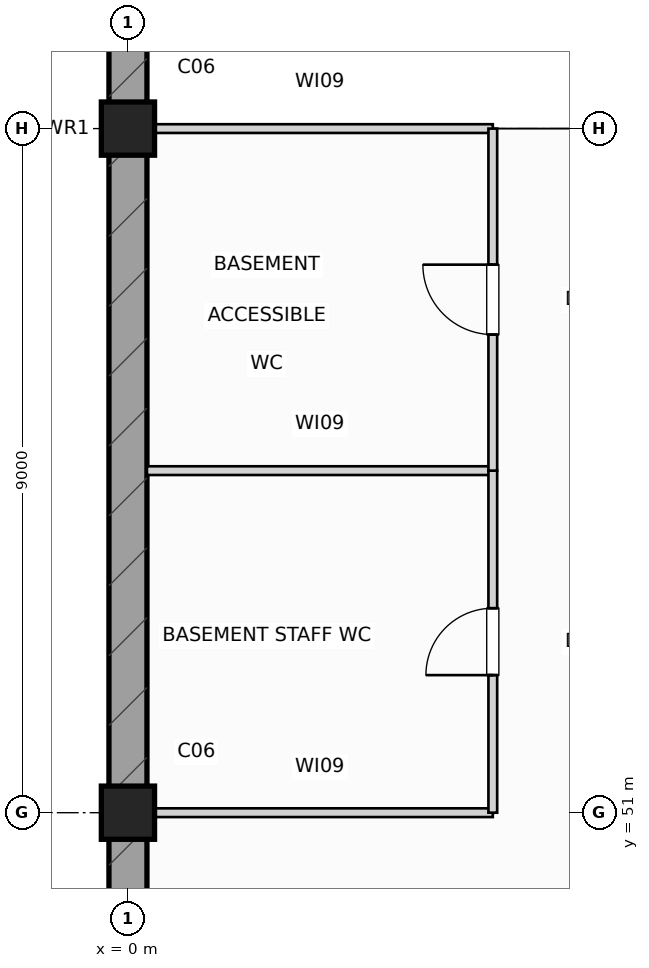
"""IFC4 building model, lengths in metres.
Left out: names, types, materials, properties, quantities, classifications, styles, units other than length and angle.
Written with IfcOpenShell. Run it as: python <this file> out.ifc"""

import sys

from ifc_helpers import new_model, si_unit, direction, frame, frame_2d, origin, origin_2d, place, context, subcontext, project, spatial, rectangle, extrude, element, fill, save


model = new_model("IFC4")
c1 = context("Model", 3, precision=1e-05, world=origin(), true_north=direction((0.0, 1.0)))
c2 = subcontext(c1, "Body", "Model", "MODEL_VIEW")
j1 = project(units=[si_unit("LENGTHUNIT", "METRE"), si_unit("PLANEANGLEUNIT", "RADIAN")], contexts=[c1])
p1 = place(None, origin())
s1 = spatial("IfcSite", under=j1, at=p1, CompositionType="ELEMENT")
p2 = place(p1, origin())
s2 = spatial("IfcBuilding", under=s1, at=p2, CompositionType="ELEMENT")
p3 = place(p2, frame((0.0, 0.0, -5.4)))
s3 = spatial("IfcBuildingStorey", under=s2, at=p3, CompositionType="ELEMENT", Elevation=-5.4)
for number, where, z_axis, x_axis in (
    (1, (0.0, 51.0, 0.0), (0.0, 0.0, 1.0), (1.0, 0.0, 0.0)),
    (2, (0.0, 60.0, 0.0), (0.0, 0.0, 1.0), (1.0, 0.0, 0.0)),
):
    element("IfcColumn", number, at=place(p3, frame(where, z_axis=z_axis, x_axis=x_axis)), inside=s3, PredefinedType="COLUMN", context=c2, shape_type="SweptSolid", body=[
        extrude(rectangle(XDim=0.7, YDim=0.7, at=origin_2d()), origin(), (0.0, 0.0, 1.0), 5.4),
    ])
p4 = place(p3, frame((0.0, 0.0, 0.0), z_axis=(0.0, 0.0, 1.0), x_axis=(0.0, 1.0, 0.0)))
e3 = element("IfcWall", 3, at=p4, inside=s3, PredefinedType="USERDEFINED", context=c2, shape_type="SweptSolid", body=[
    extrude(rectangle(XDim=120.0, YDim=0.5, at=frame_2d((60.0, 0.0))), origin(), (0.0, 0.0, 1.0), 5.08),
])
p5 = place(p3, frame((0.25, 51.0, 0.0), z_axis=(0.0, 0.0, 1.0), x_axis=(1.0, 0.0, 0.0)))
e4 = element("IfcWall", 4, at=p5, inside=s3, PredefinedType="PARTITIONING", context=c2, shape_type="SweptSolid", body=[
    extrude(rectangle(XDim=4.55, YDim=0.115, at=frame_2d((2.275, 0.0))), origin(), (0.0, 0.0, 1.0), 4.495),
])
p6 = place(p3, frame((0.25, 55.5, 0.0), z_axis=(0.0, 0.0, 1.0), x_axis=(1.0, 0.0, 0.0)))
e5 = element("IfcWall", 5, at=p6, inside=s3, PredefinedType="PARTITIONING", context=c2, shape_type="SweptSolid", body=[
    extrude(rectangle(XDim=4.55, YDim=0.115, at=frame_2d((2.275, 0.0))), origin(), (0.0, 0.0, 1.0), 4.685),
])
p7 = place(p3, frame((0.25, 60.0, 0.0), z_axis=(0.0, 0.0, 1.0), x_axis=(1.0, 0.0, 0.0)))
e6 = element("IfcWall", 6, at=p7, inside=s3, PredefinedType="PARTITIONING", context=c2, shape_type="SweptSolid", body=[
    extrude(rectangle(XDim=4.55, YDim=0.115, at=frame_2d((2.275, 0.0))), origin(), (0.0, 0.0, 1.0), 4.455),
])
p8 = place(p3, frame((4.8, 51.0, 0.0), z_axis=(0.0, 0.0, 1.0), x_axis=(0.0, 1.0, 0.0)))
e7 = element("IfcWall", 7, at=p8, inside=s3, PredefinedType="PARTITIONING", context=c2, shape_type="SweptSolid", body=[
    extrude(rectangle(XDim=4.5, YDim=0.115, at=frame_2d((2.25, 0.0))), origin(), (0.0, 0.0, 1.0), 4.495),
])
p9 = place(p8, frame((1.81, 0.0, 0.0)))
e8 = element("IfcOpeningElement", 8, at=p9, cuts=e7, PredefinedType="OPENING", context=c2, shape_type="SweptSolid", body=[
    extrude(rectangle(XDim=0.88, YDim=2.06, at=frame_2d((0.44, 1.03))), frame((0.0, 0.067, 0.0), z_axis=(0.0, -1.0, 0.0), x_axis=(1.0, 0.0, 0.0)), (0.0, 0.0, 1.0), 0.135),
])
p10 = place(p3, frame((4.8, 55.5, 0.0), z_axis=(0.0, 0.0, 1.0), x_axis=(0.0, 1.0, 0.0)))
e9 = element("IfcWall", 9, at=p10, inside=s3, PredefinedType="PARTITIONING", context=c2, shape_type="SweptSolid", body=[
    extrude(rectangle(XDim=4.5, YDim=0.115, at=frame_2d((2.25, 0.0))), origin(), (0.0, 0.0, 1.0), 4.455),
])
p11 = place(p10, frame((1.79, 0.0, 0.0)))
e10 = element("IfcOpeningElement", 10, at=p11, cuts=e9, PredefinedType="OPENING", context=c2, shape_type="SweptSolid", body=[
    extrude(rectangle(XDim=0.92, YDim=2.08, at=frame_2d((0.46, 1.04))), frame((0.0, 0.067, 0.0), z_axis=(0.0, -1.0, 0.0), x_axis=(1.0, 0.0, 0.0)), (0.0, 0.0, 1.0), 0.135),
])
p12 = place(p9, origin())
e11 = element("IfcDoor", 11, at=p12, inside=s3, OperationType="SINGLE_SWING_LEFT", PredefinedType="DOOR", context=c2, shape_type="SweptSolid", body=[
    extrude(rectangle(XDim=0.88, YDim=2.06, at=frame_2d((0.44, 1.03))), frame((0.0, 0.025, 0.0), z_axis=(0.0, -1.0, 0.0), x_axis=(1.0, 0.0, 0.0)), (0.0, 0.0, 1.0), 0.05),
])
fill(e8, e11)
p13 = place(p11, origin())
e12 = element("IfcDoor", 12, at=p13, inside=s3, OperationType="SINGLE_SWING_RIGHT", PredefinedType="DOOR", context=c2, shape_type="SweptSolid", body=[
    extrude(rectangle(XDim=0.92, YDim=2.08, at=frame_2d((0.46, 1.04))), frame((0.0, 0.025, 0.0), z_axis=(0.0, -1.0, 0.0), x_axis=(1.0, 0.0, 0.0)), (0.0, 0.0, 1.0), 0.05),
])
fill(e10, e12)
save(model, sys.argv[1])
